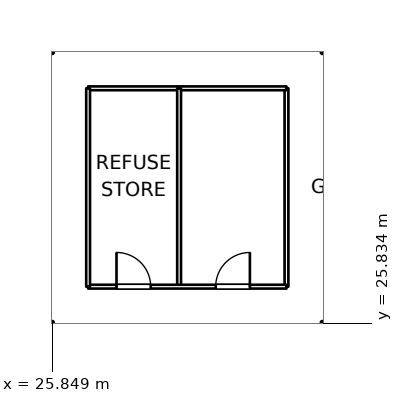
"""IFC4 building model, lengths in metres.
Left out: names, types, materials, properties, quantities, classifications, styles, units other than length and angle.
Written with IfcOpenShell. Run it as: python <this file> out.ifc"""

import sys

from ifc_helpers import new_model, si_unit, direction, frame, frame_2d, origin, origin_2d, place, context, subcontext, project, spatial, rectangle, extrude, element, fill, save


model = new_model("IFC4")
c1 = context("Model", 3, precision=1e-05, world=origin(), true_north=direction((0.0, 1.0)))
c2 = subcontext(c1, "Body", "Model", "MODEL_VIEW")
j1 = project(units=[si_unit("LENGTHUNIT", "METRE"), si_unit("PLANEANGLEUNIT", "RADIAN")], contexts=[c1])
p1 = place(None, origin())
s1 = spatial("IfcSite", under=j1, at=p1, CompositionType="ELEMENT")
p2 = place(p1, origin())
s2 = spatial("IfcBuilding", under=s1, at=p2, CompositionType="ELEMENT")
p3 = place(p2, origin())
s3 = spatial("IfcBuildingStorey", under=s2, at=p3, CompositionType="ELEMENT", Elevation=0.0)
for number, where, z_axis, x_axis in (
    (1, (25.2, 25.2, 0.0), (0.0, 0.0, 1.0), (1.0, 0.0, 0.0)),
    (2, (25.2, 33.6, 0.0), (0.0, 0.0, 1.0), (1.0, 0.0, 0.0)),
    (3, (33.6, 25.2, 0.0), (0.0, 0.0, 1.0), (1.0, 0.0, 0.0)),
    (4, (33.6, 33.6, 0.0), (0.0, 0.0, 1.0), (1.0, 0.0, 0.0)),
):
    element("IfcColumn", number, at=place(p3, frame(where, z_axis=z_axis, x_axis=x_axis)), inside=s3, PredefinedType="COLUMN", context=c2, shape_type="SweptSolid", body=[
        extrude(rectangle(XDim=1.3, YDim=1.3, at=origin_2d()), origin(), (0.0, 0.0, 1.0), 6.0),
    ])
p4 = place(p3, frame((26.79, 26.79, 0.0), z_axis=(0.0, 0.0, 1.0), x_axis=(1.0, 0.0, 0.0)))
e5 = element("IfcWall", 5, at=p4, inside=s3, PredefinedType="PARTITIONING", context=c2, shape_type="SweptSolid", body=[
    extrude(rectangle(XDim=5.22, YDim=0.1, at=frame_2d((2.61, 0.0))), origin(), (0.0, 0.0, 1.0), 5.7),
])
p5 = place(p4, frame((0.747, 0.0, 0.0)))
e6 = element("IfcOpeningElement", 6, at=p5, cuts=e5, PredefinedType="OPENING", context=c2, shape_type="SweptSolid", body=[
    extrude(rectangle(XDim=0.9, YDim=2.1, at=frame_2d((0.45, 1.05))), frame((0.0, 0.06, 0.0), z_axis=(0.0, -1.0, 0.0), x_axis=(1.0, 0.0, 0.0)), (0.0, 0.0, 1.0), 0.12),
])
p6 = place(p4, frame((3.357, 0.0, 0.0)))
e7 = element("IfcOpeningElement", 7, at=p6, cuts=e5, PredefinedType="OPENING", context=c2, shape_type="SweptSolid", body=[
    extrude(rectangle(XDim=0.9, YDim=2.1, at=frame_2d((0.45, 1.05))), frame((0.0, 0.06, 0.0), z_axis=(0.0, -1.0, 0.0), x_axis=(1.0, 0.0, 0.0)), (0.0, 0.0, 1.0), 0.12),
])
for number, where, z_axis, x_axis in (
    (8, (32.01, 26.79, 0.0), (0.0, 0.0, 1.0), (0.0, 1.0, 0.0)),
    (9, (32.01, 32.01, 0.0), (0.0, 0.0, 1.0), (-1.0, 0.0, 0.0)),
    (10, (26.79, 32.01, 0.0), (0.0, 0.0, 1.0), (0.0, -1.0, 0.0)),
    (11, (29.185, 26.79, 0.0), (0.0, 0.0, 1.0), (0.0, 1.0, 0.0)),
):
    element("IfcWall", number, at=place(p3, frame(where, z_axis=z_axis, x_axis=x_axis)), inside=s3, PredefinedType="PARTITIONING", context=c2, shape_type="SweptSolid", body=[
        extrude(rectangle(XDim=5.22, YDim=0.1, at=frame_2d((2.61, 0.0))), origin(), (0.0, 0.0, 1.0), 5.7),
    ])
p7 = place(p5, origin())
e12 = element("IfcDoor", 12, at=p7, inside=s3, OperationType="SINGLE_SWING_LEFT", PredefinedType="DOOR", context=c2, shape_type="SweptSolid", body=[
    extrude(rectangle(XDim=0.9, YDim=2.1, at=frame_2d((0.45, 1.05))), frame((0.0, 0.025, 0.0), z_axis=(0.0, -1.0, 0.0), x_axis=(1.0, 0.0, 0.0)), (0.0, 0.0, 1.0), 0.05),
])
fill(e6, e12)
p8 = place(p6, origin())
e13 = element("IfcDoor", 13, at=p8, inside=s3, OperationType="SINGLE_SWING_RIGHT", PredefinedType="DOOR", context=c2, shape_type="SweptSolid", body=[
    extrude(rectangle(XDim=0.9, YDim=2.1, at=frame_2d((0.45, 1.05))), frame((0.0, 0.025, 0.0), z_axis=(0.0, -1.0, 0.0), x_axis=(1.0, 0.0, 0.0)), (0.0, 0.0, 1.0), 0.05),
])
fill(e7, e13)
save(model, sys.argv[1])
